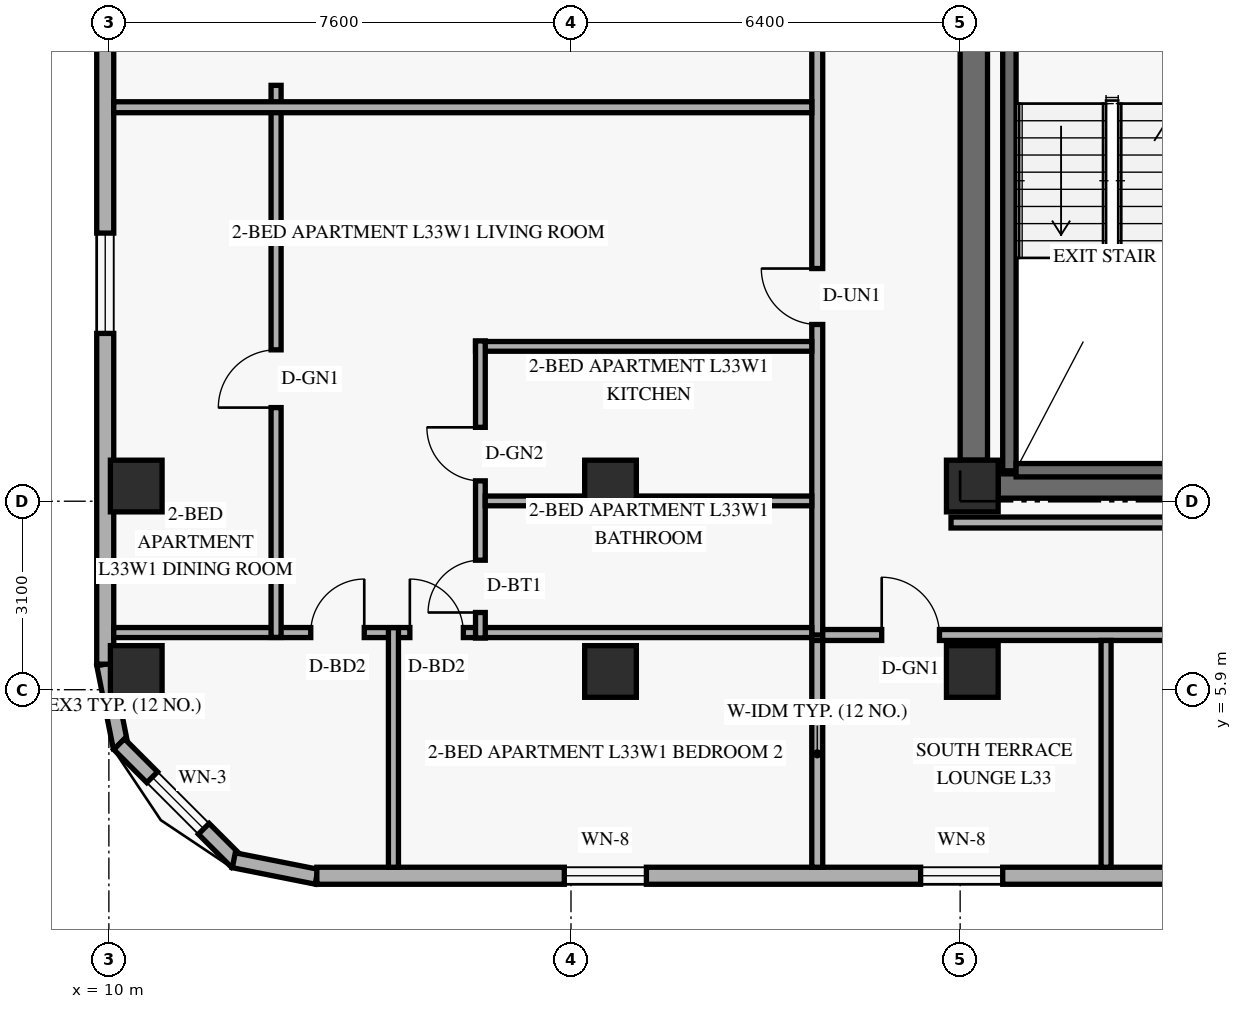
"""IFC4 building model, lengths in metres.
Left out: names, types, materials, properties, quantities, classifications, styles, units other than length and angle.
Written with IfcOpenShell. Run it as: python <this file> out.ifc"""

import sys

from ifc_helpers import new_model, si_unit, direction, frame, frame_2d, origin, origin_2d, place, context, subcontext, project, spatial, rectangle, extrude, element, fill, save


model = new_model("IFC4")
c1 = context("Model", 3, precision=1e-05, world=origin(), true_north=direction((0.0, 1.0)))
c2 = subcontext(c1, "Body", "Model", "MODEL_VIEW")
j1 = project(units=[si_unit("LENGTHUNIT", "METRE"), si_unit("PLANEANGLEUNIT", "RADIAN")], contexts=[c1])
p1 = place(None, origin())
s1 = spatial("IfcSite", under=j1, at=p1, CompositionType="ELEMENT")
p2 = place(p1, origin())
s2 = spatial("IfcBuilding", under=s1, at=p2, CompositionType="ELEMENT")
p3 = place(p2, frame((0.0, 0.0, 128.4)))
s3 = spatial("IfcBuildingStorey", under=s2, at=p3, CompositionType="ELEMENT", Elevation=128.4)
p4 = place(p3, frame((24.225, 9.675, 0.0), z_axis=(0.0, 0.0, 1.0), x_axis=(0.0, 1.0, 0.0)))
e1 = element("IfcWall", 1, at=p4, inside=s3, PredefinedType="SHEAR", context=c2, shape_type="SweptSolid", body=[
    extrude(rectangle(XDim=7.45, YDim=0.45, at=frame_2d((3.725, 0.0))), origin(), (0.0, 0.0, 1.0), 2.749),
])
p5 = place(p3, frame((24.625, 9.25, 0.0), z_axis=(0.0, 0.0, 1.0), x_axis=(1.0, 0.0, 0.0)))
e2 = element("IfcWall", 2, at=p5, inside=s3, PredefinedType="SHEAR", context=c2, shape_type="SweptSolid", body=[
    extrude(rectangle(XDim=10.15, YDim=0.4, at=frame_2d((5.075, 0.0))), origin(), (0.0, 0.0, 1.0), 3.36),
])
p6 = place(p5, frame((5.2, 0.0, 0.0)))
e3 = element("IfcOpeningElement", 3, at=p6, cuts=e2, PredefinedType="OPENING", context=c2, shape_type="SweptSolid", body=[
    extrude(rectangle(XDim=1.05, YDim=2.15, at=frame_2d((0.525, 1.075))), frame((0.0, 0.21, 0.0), z_axis=(0.0, -1.0, 0.0), x_axis=(1.0, 0.0, 0.0)), (0.0, 0.0, 1.0), 0.42),
])
p7 = place(p3, frame((24.81, 9.5, 0.0), z_axis=(0.0, 0.0, 1.0), x_axis=(0.0, 1.0, 0.0)))
e4 = element("IfcWall", 4, at=p7, inside=s3, PredefinedType="SHEAR", context=c2, shape_type="SweptSolid", body=[
    extrude(rectangle(XDim=7.76, YDim=0.22, at=frame_2d((3.88, 0.0))), origin(), (0.0, 0.0, 1.0), 3.36),
])
p8 = place(p3, frame((24.92, 9.51, 0.0), z_axis=(0.0, 0.0, 1.0), x_axis=(1.0, 0.0, 0.0)))
e5 = element("IfcWall", 5, at=p8, inside=s3, PredefinedType="SHEAR", context=c2, shape_type="SweptSolid", body=[
    extrude(rectangle(XDim=3.16, YDim=0.22, at=frame_2d((1.58, 0.0))), origin(), (0.0, 0.0, 1.0), 3.36),
])
for number, where, z_axis, x_axis in (
    (6, (10.45, 6.2, 0.0), (0.0, 0.0, 1.0), (1.0, 0.0, 0.0)),
    (7, (10.45, 9.25, 0.0), (0.0, 0.0, 1.0), (1.0, 0.0, 0.0)),
    (8, (18.25, 6.2, 0.0), (0.0, 0.0, 1.0), (1.0, 0.0, 0.0)),
    (9, (18.25, 9.25, 0.0), (0.0, 0.0, 1.0), (1.0, 0.0, 0.0)),
    (10, (24.2, 6.2, 0.0), (0.0, 0.0, 1.0), (1.0, 0.0, 0.0)),
    (11, (24.2, 9.25, 0.0), (0.0, 0.0, 1.0), (1.0, 0.0, 0.0)),
):
    element("IfcColumn", number, at=place(p3, frame(where, z_axis=z_axis, x_axis=x_axis)), inside=s3, PredefinedType="COLUMN", context=c2, shape_type="SweptSolid", body=[
        extrude(rectangle(XDim=0.85, YDim=0.85, at=origin_2d()), origin(), (0.0, 0.0, 1.0), 3.6),
    ])
p9 = place(p3, frame((9.924, 6.316, 0.0), z_axis=(0.0, 0.0, 1.0), x_axis=(0.195000137217, -0.980803214965, 0.0)))
e12 = element("IfcWall", 12, at=p9, inside=s3, PredefinedType="SOLIDWALL", context=c2, shape_type="SweptSolid", body=[
    extrude(rectangle(XDim=1.388, YDim=0.25, at=frame_2d((0.694, 0.0))), origin(), (0.0, 0.0, 1.0), 3.36),
])
p10 = place(p3, frame((10.168, 5.005, 0.0), z_axis=(0.0, 0.0, 1.0), x_axis=(0.707151344399, -0.707062215165, 0.0)))
e13 = element("IfcWall", 13, at=p10, inside=s3, PredefinedType="SOLIDWALL", context=c2, shape_type="SweptSolid", body=[
    extrude(rectangle(XDim=2.739, YDim=0.25, at=frame_2d((1.37, 0.0))), origin(), (0.0, 0.0, 1.0), 3.36),
])
p11 = place(p10, frame((0.77, 0.0, 0.85)))
e14 = element("IfcOpeningElement", 14, at=p11, cuts=e13, PredefinedType="OPENING", context=c2, shape_type="SweptSolid", body=[
    extrude(rectangle(XDim=1.2, YDim=1.5, at=frame_2d((0.6, 0.75))), frame((0.0, 0.135, 0.0), z_axis=(0.0, -1.0, 0.0), x_axis=(1.0, 0.0, 0.0)), (0.0, 0.0, 1.0), 0.27),
])
p12 = place(p3, frame((12.054, 3.095, 0.0), z_axis=(0.0, 0.0, 1.0), x_axis=(0.980809899341, -0.19496651342, 0.0)))
e15 = element("IfcWall", 15, at=p12, inside=s3, PredefinedType="SOLIDWALL", context=c2, shape_type="SweptSolid", body=[
    extrude(rectangle(XDim=1.389, YDim=0.25, at=frame_2d((0.694, 0.0))), origin(), (0.0, 0.0, 1.0), 3.36),
])
p13 = place(p3, frame((13.42, 2.84, 0.0), z_axis=(0.0, 0.0, 1.0), x_axis=(1.0, 0.0, 0.0)))
e16 = element("IfcWall", 16, at=p13, inside=s3, PredefinedType="SOLIDWALL", context=c2, shape_type="SweptSolid", body=[
    extrude(rectangle(XDim=36.56, YDim=0.28, at=frame_2d((18.28, 0.0))), origin(), (0.0, 0.0, 1.0), 3.36),
])
p14 = place(p13, frame((4.07, 0.0, 0.85)))
e17 = element("IfcOpeningElement", 17, at=p14, cuts=e16, PredefinedType="OPENING", context=c2, shape_type="SweptSolid", body=[
    extrude(rectangle(XDim=1.35, YDim=1.55, at=frame_2d((0.675, 0.775))), frame((0.0, 0.15, 0.0), z_axis=(0.0, -1.0, 0.0), x_axis=(1.0, 0.0, 0.0)), (0.0, 0.0, 1.0), 0.3),
])
p15 = place(p13, frame((9.93, 0.0, 0.85)))
e18 = element("IfcOpeningElement", 18, at=p15, cuts=e16, PredefinedType="OPENING", context=c2, shape_type="SweptSolid", body=[
    extrude(rectangle(XDim=1.35, YDim=1.55, at=frame_2d((0.675, 0.775))), frame((0.0, 0.15, 0.0), z_axis=(0.0, -1.0, 0.0), x_axis=(1.0, 0.0, 0.0)), (0.0, 0.0, 1.0), 0.3),
])
p16 = place(p13, frame((16.815, 0.0, 0.85)))
e19 = element("IfcOpeningElement", 19, at=p16, cuts=e16, PredefinedType="OPENING", context=c2, shape_type="SweptSolid", body=[
    extrude(rectangle(XDim=1.35, YDim=1.55, at=frame_2d((0.675, 0.775))), frame((0.0, 0.15, 0.0), z_axis=(0.0, -1.0, 0.0), x_axis=(1.0, 0.0, 0.0)), (0.0, 0.0, 1.0), 0.3),
])
p17 = place(p13, frame((22.39, 0.0, 0.85)))
e20 = element("IfcOpeningElement", 20, at=p17, cuts=e16, PredefinedType="OPENING", context=c2, shape_type="SweptSolid", body=[
    extrude(rectangle(XDim=1.35, YDim=1.55, at=frame_2d((0.675, 0.775))), frame((0.0, 0.15, 0.0), z_axis=(0.0, -1.0, 0.0), x_axis=(1.0, 0.0, 0.0)), (0.0, 0.0, 1.0), 0.3),
])
p18 = place(p13, frame((26.55, 0.0, 0.85)))
e21 = element("IfcOpeningElement", 21, at=p18, cuts=e16, PredefinedType="OPENING", context=c2, shape_type="SweptSolid", body=[
    extrude(rectangle(XDim=1.35, YDim=1.55, at=frame_2d((0.675, 0.775))), frame((0.0, 0.15, 0.0), z_axis=(0.0, -1.0, 0.0), x_axis=(1.0, 0.0, 0.0)), (0.0, 0.0, 1.0), 0.3),
])
p19 = place(p13, frame((31.375, 0.0, 0.85)))
e22 = element("IfcOpeningElement", 22, at=p19, cuts=e16, PredefinedType="OPENING", context=c2, shape_type="SweptSolid", body=[
    extrude(rectangle(XDim=1.35, YDim=1.55, at=frame_2d((0.675, 0.775))), frame((0.0, 0.15, 0.0), z_axis=(0.0, -1.0, 0.0), x_axis=(1.0, 0.0, 0.0)), (0.0, 0.0, 1.0), 0.3),
])
p20 = place(p13, frame((34.495, 0.0, 0.85)))
e23 = element("IfcOpeningElement", 23, at=p20, cuts=e16, PredefinedType="OPENING", context=c2, shape_type="SweptSolid", body=[
    extrude(rectangle(XDim=1.35, YDim=1.55, at=frame_2d((0.675, 0.775))), frame((0.0, 0.15, 0.0), z_axis=(0.0, -1.0, 0.0), x_axis=(1.0, 0.0, 0.0)), (0.0, 0.0, 1.0), 0.3),
])
p21 = place(p3, frame((9.94, 41.68, 0.0), z_axis=(0.0, 0.0, 1.0), x_axis=(0.0, -1.0, 0.0)))
e24 = element("IfcWall", 24, at=p21, inside=s3, PredefinedType="SOLIDWALL", context=c2, shape_type="SweptSolid", body=[
    extrude(rectangle(XDim=35.36, YDim=0.28, at=frame_2d((17.68, 0.0))), origin(), (0.0, 0.0, 1.0), 3.36),
])
p22 = place(p21, frame((28.27, 0.0, 0.85)))
e25 = element("IfcOpeningElement", 25, at=p22, cuts=e24, PredefinedType="OPENING", context=c2, shape_type="SweptSolid", body=[
    extrude(rectangle(XDim=1.65, YDim=1.6, at=frame_2d((0.825, 0.8))), frame((0.0, 0.15, 0.0), z_axis=(0.0, -1.0, 0.0), x_axis=(1.0, 0.0, 0.0)), (0.0, 0.0, 1.0), 0.3),
])
p23 = place(p21, frame((22.112, 0.0, 0.85)))
e26 = element("IfcOpeningElement", 26, at=p23, cuts=e24, PredefinedType="OPENING", context=c2, shape_type="SweptSolid", body=[
    extrude(rectangle(XDim=1.2, YDim=1.5, at=frame_2d((0.6, 0.75))), frame((0.0, 0.15, 0.0), z_axis=(0.0, -1.0, 0.0), x_axis=(1.0, 0.0, 0.0)), (0.0, 0.0, 1.0), 0.3),
])
p24 = place(p21, frame((17.469, 0.0, 0.85)))
e27 = element("IfcOpeningElement", 27, at=p24, cuts=e24, PredefinedType="OPENING", context=c2, shape_type="SweptSolid", body=[
    extrude(rectangle(XDim=1.65, YDim=1.6, at=frame_2d((0.825, 0.8))), frame((0.0, 0.15, 0.0), z_axis=(0.0, -1.0, 0.0), x_axis=(1.0, 0.0, 0.0)), (0.0, 0.0, 1.0), 0.3),
])
p25 = place(p21, frame((12.562, 0.0, 0.85)))
e28 = element("IfcOpeningElement", 28, at=p25, cuts=e24, PredefinedType="OPENING", context=c2, shape_type="SweptSolid", body=[
    extrude(rectangle(XDim=1.65, YDim=1.6, at=frame_2d((0.825, 0.8))), frame((0.0, 0.15, 0.0), z_axis=(0.0, -1.0, 0.0), x_axis=(1.0, 0.0, 0.0)), (0.0, 0.0, 1.0), 0.3),
])
p26 = place(p21, frame((8.698, 0.0, 0.85)))
e29 = element("IfcOpeningElement", 29, at=p26, cuts=e24, PredefinedType="OPENING", context=c2, shape_type="SweptSolid", body=[
    extrude(rectangle(XDim=1.65, YDim=1.6, at=frame_2d((0.825, 0.8))), frame((0.0, 0.15, 0.0), z_axis=(0.0, -1.0, 0.0), x_axis=(1.0, 0.0, 0.0)), (0.0, 0.0, 1.0), 0.3),
])
p27 = place(p21, frame((4.95, 0.0, 0.85)))
e30 = element("IfcOpeningElement", 30, at=p27, cuts=e24, PredefinedType="OPENING", context=c2, shape_type="SweptSolid", body=[
    extrude(rectangle(XDim=1.65, YDim=1.6, at=frame_2d((0.825, 0.8))), frame((0.0, 0.15, 0.0), z_axis=(0.0, -1.0, 0.0), x_axis=(1.0, 0.0, 0.0)), (0.0, 0.0, 1.0), 0.3),
])
p28 = place(p3, frame((21.65, 6.8, 0.0), z_axis=(0.0, 0.0, 1.0), x_axis=(0.0, 1.0, 0.0)))
e31 = element("IfcWall", 31, at=p28, inside=s3, PredefinedType="STANDARD", context=c2, shape_type="SweptSolid", body=[
    extrude(rectangle(XDim=34.4, YDim=0.18, at=frame_2d((17.2, 0.0))), origin(), (0.0, 0.0, 1.0), 2.731),
])
p29 = place(p28, frame((5.107, 0.0, 0.0)))
e32 = element("IfcOpeningElement", 32, at=p29, cuts=e31, PredefinedType="OPENING", context=c2, shape_type="SweptSolid", body=[
    extrude(rectangle(XDim=0.92, YDim=2.15, at=frame_2d((0.46, 1.075))), frame((0.0, 0.1, 0.0), z_axis=(0.0, -1.0, 0.0), x_axis=(1.0, 0.0, 0.0)), (0.0, 0.0, 1.0), 0.2),
])
p30 = place(p28, frame((13.99, 0.0, 0.0)))
e33 = element("IfcOpeningElement", 33, at=p30, cuts=e31, PredefinedType="OPENING", context=c2, shape_type="SweptSolid", body=[
    extrude(rectangle(XDim=0.92, YDim=2.15, at=frame_2d((0.46, 1.075))), frame((0.0, 0.1, 0.0), z_axis=(0.0, -1.0, 0.0), x_axis=(1.0, 0.0, 0.0)), (0.0, 0.0, 1.0), 0.2),
])
p31 = place(p28, frame((28.646, 0.0, 0.0)))
e34 = element("IfcOpeningElement", 34, at=p31, cuts=e31, PredefinedType="OPENING", context=c2, shape_type="SweptSolid", body=[
    extrude(rectangle(XDim=0.92, YDim=2.15, at=frame_2d((0.46, 1.075))), frame((0.0, 0.1, 0.0), z_axis=(0.0, -1.0, 0.0), x_axis=(1.0, 0.0, 0.0)), (0.0, 0.0, 1.0), 0.2),
])
p32 = place(p3, frame((21.74, 6.8, 0.0), z_axis=(0.0, 0.0, 1.0), x_axis=(1.0, 0.0, 0.0)))
e35 = element("IfcWall", 35, at=p32, inside=s3, PredefinedType="STANDARD", context=c2, shape_type="SweptSolid", body=[
    extrude(rectangle(XDim=13.68, YDim=0.18, at=frame_2d((6.84, 0.0))), origin(), (0.0, 0.0, 1.0), 2.731),
])
p33 = place(p32, frame((0.97, 0.0, 0.0)))
e36 = element("IfcOpeningElement", 36, at=p33, cuts=e35, PredefinedType="OPENING", context=c2, shape_type="SweptSolid", body=[
    extrude(rectangle(XDim=0.95, YDim=2.15, at=frame_2d((0.475, 1.075))), frame((0.0, 0.1, 0.0), z_axis=(0.0, -1.0, 0.0), x_axis=(1.0, 0.0, 0.0)), (0.0, 0.0, 1.0), 0.2),
])
p34 = place(p32, frame((9.11, 0.0, 0.0)))
e37 = element("IfcOpeningElement", 37, at=p34, cuts=e35, PredefinedType="OPENING", context=c2, shape_type="SweptSolid", body=[
    extrude(rectangle(XDim=0.95, YDim=2.15, at=frame_2d((0.475, 1.075))), frame((0.0, 0.1, 0.0), z_axis=(0.0, -1.0, 0.0), x_axis=(1.0, 0.0, 0.0)), (0.0, 0.0, 1.0), 0.2),
])
p35 = place(p3, frame((23.85, 8.65, 0.0), z_axis=(0.0, 0.0, 1.0), x_axis=(1.0, 0.0, 0.0)))
e38 = element("IfcWall", 38, at=p35, inside=s3, PredefinedType="STANDARD", context=c2, shape_type="SweptSolid", body=[
    extrude(rectangle(XDim=11.57, YDim=0.18, at=frame_2d((5.785, 0.0))), origin(), (0.0, 0.0, 1.0), 2.731),
])
p36 = place(p3, frame((21.65, 2.98, 0.0), z_axis=(0.0, 0.0, 1.0), x_axis=(0.0, 1.0, 0.0)))
e39 = element("IfcWall", 39, at=p36, inside=s3, PredefinedType="PARTITIONING", context=c2, shape_type="SweptSolid", body=[
    extrude(rectangle(XDim=3.73, YDim=0.18, at=frame_2d((1.865, 0.0))), origin(), (0.0, 0.0, 1.0), 2.809),
])
p37 = place(p3, frame((10.08, 6.84, 0.0), z_axis=(0.0, 0.0, 1.0), x_axis=(1.0, 0.0, 0.0)))
e40 = element("IfcWall", 40, at=p37, inside=s3, PredefinedType="PARTITIONING", context=c2, shape_type="SweptSolid", body=[
    extrude(rectangle(XDim=11.48, YDim=0.165, at=frame_2d((5.74, 0.0))), origin(), (0.0, 0.0, 1.0), 2.731),
])
p38 = place(p37, frame((3.24, 0.0, 0.0)))
e41 = element("IfcOpeningElement", 41, at=p38, cuts=e40, PredefinedType="OPENING", context=c2, shape_type="SweptSolid", body=[
    extrude(rectangle(XDim=0.88, YDim=2.14, at=frame_2d((0.44, 1.07))), frame((0.0, 0.093, 0.0), z_axis=(0.0, -1.0, 0.0), x_axis=(1.0, 0.0, 0.0)), (0.0, 0.0, 1.0), 0.185),
])
p39 = place(p37, frame((4.87, 0.0, 0.0)))
e42 = element("IfcOpeningElement", 42, at=p39, cuts=e40, PredefinedType="OPENING", context=c2, shape_type="SweptSolid", body=[
    extrude(rectangle(XDim=0.88, YDim=2.14, at=frame_2d((0.44, 1.07))), frame((0.0, 0.093, 0.0), z_axis=(0.0, -1.0, 0.0), x_axis=(1.0, 0.0, 0.0)), (0.0, 0.0, 1.0), 0.185),
])
p40 = place(p3, frame((16.03, 11.547, 0.0), z_axis=(0.0, 0.0, 1.0), x_axis=(1.0, 0.0, 0.0)))
e43 = element("IfcWall", 43, at=p40, inside=s3, PredefinedType="PLUMBINGWALL", context=c2, shape_type="SweptSolid", body=[
    extrude(rectangle(XDim=5.53, YDim=0.16, at=frame_2d((2.765, 0.0))), origin(), (0.0, 0.0, 1.0), 2.731),
])
p41 = place(p3, frame((16.11, 6.75, 0.0), z_axis=(0.0, 0.0, 1.0), x_axis=(0.0, 1.0, 0.0)))
e44 = element("IfcWall", 44, at=p41, inside=s3, PredefinedType="PLUMBINGWALL", context=c2, shape_type="SweptSolid", body=[
    extrude(rectangle(XDim=4.887, YDim=0.16, at=frame_2d((2.443, 0.0))), origin(), (0.0, 0.0, 1.0), 2.731),
])
p42 = place(p41, frame((0.42, 0.0, 0.0)))
e45 = element("IfcOpeningElement", 45, at=p42, cuts=e44, PredefinedType="OPENING", context=c2, shape_type="SweptSolid", body=[
    extrude(rectangle(XDim=0.86, YDim=2.12, at=frame_2d((0.43, 1.06))), frame((0.0, 0.09, 0.0), z_axis=(0.0, -1.0, 0.0), x_axis=(1.0, 0.0, 0.0)), (0.0, 0.0, 1.0), 0.18),
])
p43 = place(p41, frame((2.585, 0.0, 0.0)))
e46 = element("IfcOpeningElement", 46, at=p43, cuts=e44, PredefinedType="OPENING", context=c2, shape_type="SweptSolid", body=[
    extrude(rectangle(XDim=0.88, YDim=2.12, at=frame_2d((0.44, 1.06))), frame((0.0, 0.09, 0.0), z_axis=(0.0, -1.0, 0.0), x_axis=(1.0, 0.0, 0.0)), (0.0, 0.0, 1.0), 0.18),
])
p44 = place(p3, frame((16.19, 9.005, 0.0), z_axis=(0.0, 0.0, 1.0), x_axis=(1.0, 0.0, 0.0)))
e47 = element("IfcWall", 47, at=p44, inside=s3, PredefinedType="PLUMBINGWALL", context=c2, shape_type="SweptSolid", body=[
    extrude(rectangle(XDim=5.37, YDim=0.16, at=frame_2d((2.685, 0.0))), origin(), (0.0, 0.0, 1.0), 2.731),
])
p45 = place(p3, frame((12.75, 6.76, 0.0), z_axis=(0.0, 0.0, 1.0), x_axis=(0.0, 1.0, 0.0)))
e48 = element("IfcWall", 48, at=p45, inside=s3, PredefinedType="PARTITIONING", context=c2, shape_type="SweptSolid", body=[
    extrude(rectangle(XDim=9.08, YDim=0.165, at=frame_2d((4.54, 0.0))), origin(), (0.0, 0.0, 1.0), 2.731),
])
p46 = place(p45, frame((3.78, 0.0, 0.0)))
e49 = element("IfcOpeningElement", 49, at=p46, cuts=e48, PredefinedType="OPENING", context=c2, shape_type="SweptSolid", body=[
    extrude(rectangle(XDim=0.95, YDim=2.15, at=frame_2d((0.475, 1.075))), frame((0.0, 0.093, 0.0), z_axis=(0.0, -1.0, 0.0), x_axis=(1.0, 0.0, 0.0)), (0.0, 0.0, 1.0), 0.185),
])
p47 = place(p3, frame((14.68, 2.98, 0.0), z_axis=(0.0, 0.0, 1.0), x_axis=(0.0, 1.0, 0.0)))
e50 = element("IfcWall", 50, at=p47, inside=s3, PredefinedType="PARTITIONING", context=c2, shape_type="SweptSolid", body=[
    extrude(rectangle(XDim=3.94, YDim=0.165, at=frame_2d((1.97, 0.0))), origin(), (0.0, 0.0, 1.0), 2.809),
])
p48 = place(p3, frame((10.08, 15.48, 0.0), z_axis=(0.0, 0.0, 1.0), x_axis=(1.0, 0.0, 0.0)))
e51 = element("IfcWall", 51, at=p48, inside=s3, PredefinedType="PARTITIONING", context=c2, shape_type="SweptSolid", body=[
    extrude(rectangle(XDim=11.48, YDim=0.18, at=frame_2d((5.74, 0.0))), origin(), (0.0, 0.0, 1.0), 2.731),
])
p49 = place(p3, frame((26.4, 2.98, 0.0), z_axis=(0.0, 0.0, 1.0), x_axis=(0.0, 1.0, 0.0)))
e52 = element("IfcWall", 52, at=p49, inside=s3, PredefinedType="PARTITIONING", context=c2, shape_type="SweptSolid", body=[
    extrude(rectangle(XDim=3.73, YDim=0.165, at=frame_2d((1.865, 0.0))), origin(), (0.0, 0.0, 1.0), 2.809),
])
p50 = place(p11, origin())
e53 = element("IfcWindow", 53, at=p50, inside=s3, PartitioningType="SINGLE_PANEL", PredefinedType="WINDOW", context=c2, shape_type="SweptSolid", body=[
    extrude(rectangle(XDim=1.2, YDim=1.5, at=frame_2d((0.6, 0.75))), frame((0.0, 0.03, 0.0), z_axis=(0.0, -1.0, 0.0), x_axis=(1.0, 0.0, 0.0)), (0.0, 0.0, 1.0), 0.06),
])
fill(e14, e53)
p51 = place(p14, origin())
e54 = element("IfcWindow", 54, at=p51, inside=s3, PartitioningType="SINGLE_PANEL", PredefinedType="WINDOW", context=c2, shape_type="SweptSolid", body=[
    extrude(rectangle(XDim=1.35, YDim=1.55, at=frame_2d((0.675, 0.775))), frame((0.0, 0.03, 0.0), z_axis=(0.0, -1.0, 0.0), x_axis=(1.0, 0.0, 0.0)), (0.0, 0.0, 1.0), 0.06),
])
fill(e17, e54)
p52 = place(p15, origin())
e55 = element("IfcWindow", 55, at=p52, inside=s3, PartitioningType="SINGLE_PANEL", PredefinedType="WINDOW", context=c2, shape_type="SweptSolid", body=[
    extrude(rectangle(XDim=1.35, YDim=1.55, at=frame_2d((0.675, 0.775))), frame((0.0, 0.03, 0.0), z_axis=(0.0, -1.0, 0.0), x_axis=(1.0, 0.0, 0.0)), (0.0, 0.0, 1.0), 0.06),
])
fill(e18, e55)
p53 = place(p22, origin())
e56 = element("IfcWindow", 56, at=p53, inside=s3, PartitioningType="SINGLE_PANEL", PredefinedType="WINDOW", context=c2, shape_type="SweptSolid", body=[
    extrude(rectangle(XDim=1.65, YDim=1.6, at=frame_2d((0.825, 0.8))), frame((0.0, 0.03, 0.0), z_axis=(0.0, -1.0, 0.0), x_axis=(1.0, 0.0, 0.0)), (0.0, 0.0, 1.0), 0.06),
])
fill(e25, e56)
p54 = place(p46, origin())
e57 = element("IfcDoor", 57, at=p54, inside=s3, OperationType="SINGLE_SWING_LEFT", PredefinedType="DOOR", context=c2, shape_type="SweptSolid", body=[
    extrude(rectangle(XDim=0.95, YDim=2.15, at=frame_2d((0.475, 1.075))), frame((0.0, 0.025, 0.0), z_axis=(0.0, -1.0, 0.0), x_axis=(1.0, 0.0, 0.0)), (0.0, 0.0, 1.0), 0.05),
])
fill(e49, e57)
p55 = place(p29, origin())
e58 = element("IfcDoor", 58, at=p55, inside=s3, OperationType="SINGLE_SWING_RIGHT", PredefinedType="DOOR", context=c2, shape_type="SweptSolid", body=[
    extrude(rectangle(XDim=0.92, YDim=2.15, at=frame_2d((0.46, 1.075))), frame((0.0, 0.025, 0.0), z_axis=(0.0, -1.0, 0.0), x_axis=(1.0, 0.0, 0.0)), (0.0, 0.0, 1.0), 0.05),
])
fill(e32, e58)
p56 = place(p42, origin())
e59 = element("IfcDoor", 59, at=p56, inside=s3, OperationType="SINGLE_SWING_LEFT", PredefinedType="DOOR", context=c2, shape_type="SweptSolid", body=[
    extrude(rectangle(XDim=0.86, YDim=2.12, at=frame_2d((0.43, 1.06))), frame((0.0, 0.025, 0.0), z_axis=(0.0, -1.0, 0.0), x_axis=(1.0, 0.0, 0.0)), (0.0, 0.0, 1.0), 0.05),
])
fill(e45, e59)
p57 = place(p43, origin())
e60 = element("IfcDoor", 60, at=p57, inside=s3, OperationType="SINGLE_SWING_RIGHT", PredefinedType="DOOR", context=c2, shape_type="SweptSolid", body=[
    extrude(rectangle(XDim=0.88, YDim=2.12, at=frame_2d((0.44, 1.06))), frame((0.0, 0.025, 0.0), z_axis=(0.0, -1.0, 0.0), x_axis=(1.0, 0.0, 0.0)), (0.0, 0.0, 1.0), 0.05),
])
fill(e46, e60)
p58 = place(p38, origin())
e61 = element("IfcDoor", 61, at=p58, inside=s3, OperationType="SINGLE_SWING_RIGHT", PredefinedType="DOOR", context=c2, shape_type="SweptSolid", body=[
    extrude(rectangle(XDim=0.88, YDim=2.14, at=frame_2d((0.44, 1.07))), frame((0.0, 0.025, 0.0), z_axis=(0.0, -1.0, 0.0), x_axis=(1.0, 0.0, 0.0)), (0.0, 0.0, 1.0), 0.05),
])
fill(e41, e61)
p59 = place(p39, origin())
e62 = element("IfcDoor", 62, at=p59, inside=s3, OperationType="SINGLE_SWING_LEFT", PredefinedType="DOOR", context=c2, shape_type="SweptSolid", body=[
    extrude(rectangle(XDim=0.88, YDim=2.14, at=frame_2d((0.44, 1.07))), frame((0.0, 0.025, 0.0), z_axis=(0.0, -1.0, 0.0), x_axis=(1.0, 0.0, 0.0)), (0.0, 0.0, 1.0), 0.05),
])
fill(e42, e62)
p60 = place(p33, origin())
e63 = element("IfcDoor", 63, at=p60, inside=s3, OperationType="SINGLE_SWING_LEFT", PredefinedType="DOOR", context=c2, shape_type="SweptSolid", body=[
    extrude(rectangle(XDim=0.95, YDim=2.15, at=frame_2d((0.475, 1.075))), frame((0.0, 0.025, 0.0), z_axis=(0.0, -1.0, 0.0), x_axis=(1.0, 0.0, 0.0)), (0.0, 0.0, 1.0), 0.05),
])
fill(e36, e63)
save(model, sys.argv[1])
